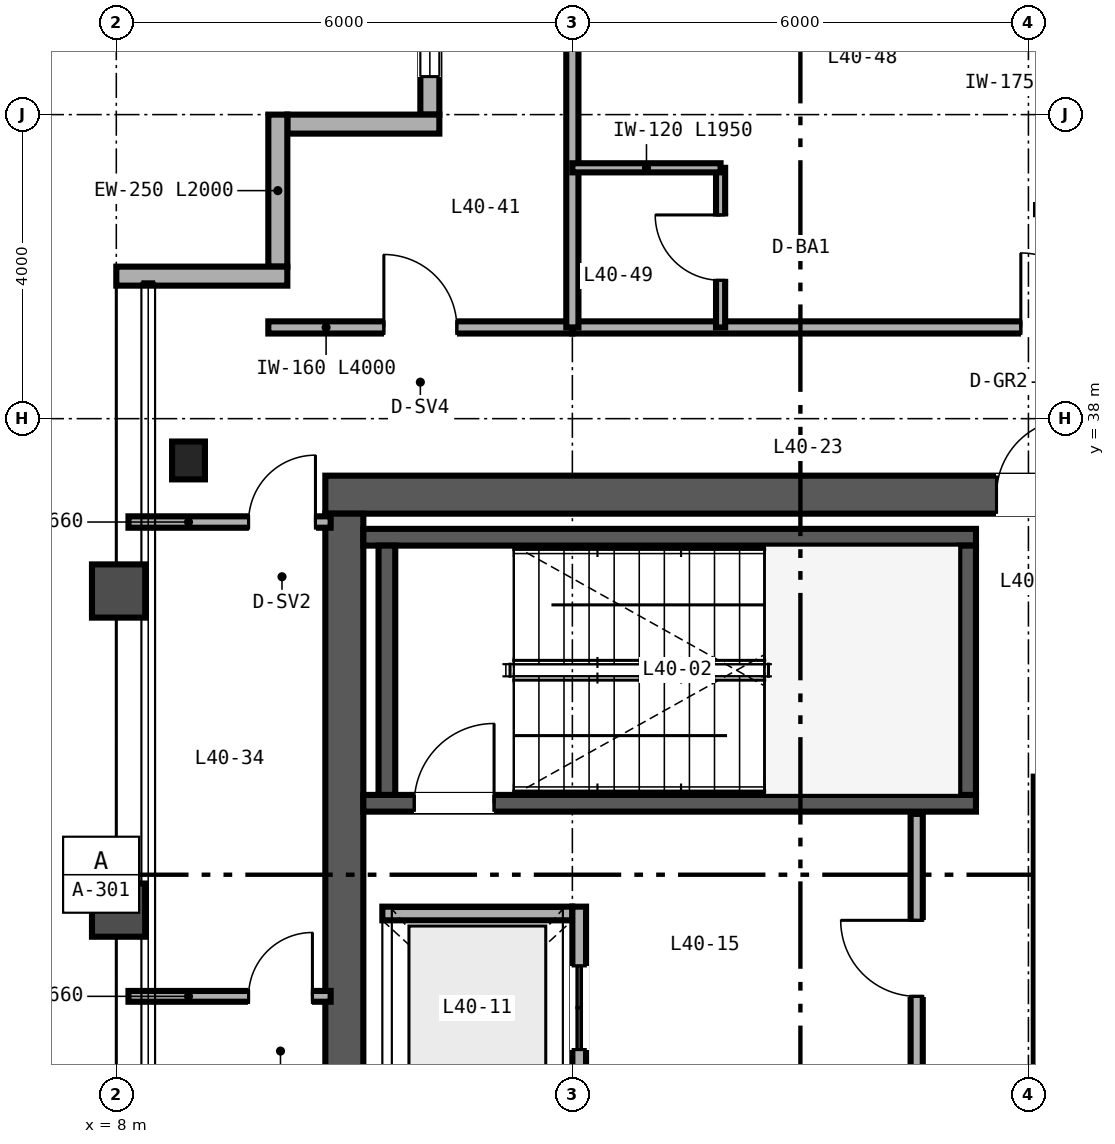
"""IFC4 building model, lengths in metres.
Left out: names, types, materials, properties, quantities, classifications, styles, units other than length and angle.
Written with IfcOpenShell. Run it as: python <this file> out.ifc"""

import sys

from ifc_helpers import new_model, si_unit, direction, frame, frame_2d, origin, origin_2d, place, context, subcontext, project, spatial, rectangle, i_section, extrude, source, transform, mapped, element, fill, save


model = new_model("IFC4")
c1 = context("Model", 3, precision=1e-05, world=origin(), true_north=direction((0.0, 1.0)))
c2 = subcontext(c1, "Body", "Model", "MODEL_VIEW")
j1 = project(units=[si_unit("LENGTHUNIT", "METRE"), si_unit("PLANEANGLEUNIT", "RADIAN")], contexts=[c1])
p1 = place(None, origin())
s1 = spatial("IfcSite", under=j1, at=p1, CompositionType="ELEMENT")
p2 = place(p1, origin())
s2 = spatial("IfcBuilding", under=s1, at=p2, CompositionType="ELEMENT")
p3 = place(p2, frame((0.0, 0.0, 163.2)))
s3 = spatial("IfcBuildingStorey", under=s2, at=p3, CompositionType="ELEMENT", Elevation=163.2)
p4 = place(p3, frame((10.75, 37.0, 0.0), z_axis=(0.0, 0.0, 1.0), x_axis=(1.0, 0.0, 0.0)))
e1 = element("IfcWall", 1, at=p4, inside=s3, PredefinedType="SHEAR", context=c2, shape_type="SweptSolid", body=[
    extrude(rectangle(XDim=12.5, YDim=0.5, at=frame_2d((6.25, 0.0))), origin(), (0.0, 0.0, 1.0), 3.37),
])
p5 = place(p4, frame((8.83, 0.0, 0.0)))
e2 = element("IfcOpeningElement", 2, at=p5, cuts=e1, PredefinedType="OPENING", context=c2, shape_type="SweptSolid", body=[
    extrude(rectangle(XDim=1.0, YDim=2.15, at=frame_2d((0.5, 1.075))), frame((0.0, 0.26, 0.0), z_axis=(0.0, -1.0, 0.0), x_axis=(1.0, 0.0, 0.0)), (0.0, 0.0, 1.0), 0.52),
])
p6 = place(p3, frame((11.0, 15.25, 0.0), z_axis=(0.0, 0.0, 1.0), x_axis=(0.0, 1.0, 0.0)))
e3 = element("IfcWall", 3, at=p6, inside=s3, PredefinedType="SHEAR", context=c2, shape_type="SweptSolid", body=[
    extrude(rectangle(XDim=21.5, YDim=0.5, at=frame_2d((10.75, 0.0))), origin(), (0.0, 0.0, 1.0), 3.37),
])
p7 = place(p3, frame((11.25, 32.94, 0.0), z_axis=(0.0, 0.0, 1.0), x_axis=(1.0, 0.0, 0.0)))
e4 = element("IfcWall", 4, at=p7, inside=s3, PredefinedType="SHEAR", context=c2, shape_type="SweptSolid", body=[
    extrude(rectangle(XDim=8.06, YDim=0.22, at=frame_2d((4.03, 0.0))), origin(), (0.0, 0.0, 1.0), 3.4),
])
p8 = place(p7, frame((0.67, 0.0, 0.0)))
e5 = element("IfcOpeningElement", 5, at=p8, cuts=e4, PredefinedType="OPENING", context=c2, shape_type="SweptSolid", body=[
    extrude(rectangle(XDim=1.05, YDim=2.15, at=frame_2d((0.525, 1.075))), frame((0.0, 0.12, 0.0), z_axis=(0.0, -1.0, 0.0), x_axis=(1.0, 0.0, 0.0)), (0.0, 0.0, 1.0), 0.24),
])
p9 = place(p3, frame((11.25, 36.44, 0.0), z_axis=(0.0, 0.0, 1.0), x_axis=(1.0, 0.0, 0.0)))
e6 = element("IfcWall", 6, at=p9, inside=s3, PredefinedType="SHEAR", context=c2, shape_type="SweptSolid", body=[
    extrude(rectangle(XDim=8.06, YDim=0.22, at=frame_2d((4.03, 0.0))), origin(), (0.0, 0.0, 1.0), 3.4),
])
for number, where, z_axis, x_axis in (
    (7, (11.56, 33.05, 0.0), (0.0, 0.0, 1.0), (0.0, 1.0, 0.0)),
    (8, (19.2, 33.05, 0.0), (0.0, 0.0, 1.0), (0.0, 1.0, 0.0)),
):
    element("IfcWall", number, at=place(p3, frame(where, z_axis=z_axis, x_axis=x_axis)), inside=s3, PredefinedType="SHEAR", context=c2, shape_type="SweptSolid", body=[
        extrude(rectangle(XDim=3.28, YDim=0.22, at=frame_2d((1.64, 0.0))), origin(), (0.0, 0.0, 1.0), 3.4),
    ])
m1 = source(origin(), c2, "Body", "SweptSolid", [
    extrude(i_section(OverallWidth=0.432, OverallDepth=0.498, WebThickness=0.056, FlangeThickness=0.089, FilletRadius=0.025, at=origin_2d()), origin(), (0.0, 0.0, 1.0), 3.37),
])
p10 = place(p3, frame((8.95, 37.45, 0.0), z_axis=(0.0, 0.0, 1.0), x_axis=(1.0, 0.0, 0.0)))
e9 = element("IfcColumn", 9, at=p10, inside=s3, PredefinedType="COLUMN", context=c2, shape_type="MappedRepresentation", body=[
    mapped(m1, transform((0.0, 0.0, 0.0), scale=1.0)),
])
p11 = place(p3, frame((12.125, 44.0, 0.0), z_axis=(0.0, 0.0, 1.0), x_axis=(0.0, -1.0, 0.0)))
e10 = element("IfcWall", 10, at=p11, inside=s3, PredefinedType="SOLIDWALL", context=c2, shape_type="SweptSolid", body=[
    extrude(rectangle(XDim=2.0, YDim=0.25, at=frame_2d((1.0, 0.0))), origin(), (0.0, 0.0, 1.0), 3.37),
])
p12 = place(p11, frame((0.5, 0.0, 0.85)))
e11 = element("IfcOpeningElement", 11, at=p12, cuts=e10, PredefinedType="OPENING", context=c2, shape_type="SweptSolid", body=[
    extrude(rectangle(XDim=1.0, YDim=1.9, at=frame_2d((0.5, 0.95))), frame((0.0, 0.135, 0.0), z_axis=(0.0, -1.0, 0.0), x_axis=(1.0, 0.0, 0.0)), (0.0, 0.0, 1.0), 0.27),
])
for number, where, z_axis, x_axis in (
    (12, (12.25, 41.875, 0.0), (0.0, 0.0, 1.0), (-1.0, 0.0, 0.0)),
    (13, (10.125, 42.0, 0.0), (0.0, 0.0, 1.0), (0.0, -1.0, 0.0)),
):
    element("IfcWall", number, at=place(p3, frame(where, z_axis=z_axis, x_axis=x_axis)), inside=s3, PredefinedType="SOLIDWALL", context=c2, shape_type="SweptSolid", body=[
        extrude(rectangle(XDim=2.0, YDim=0.25, at=frame_2d((1.0, 0.0))), origin(), (0.0, 0.0, 1.0), 3.37),
    ])
p13 = place(p3, frame((10.25, 39.875, 0.0), z_axis=(0.0, 0.0, 1.0), x_axis=(-1.0, 0.0, 0.0)))
e14 = element("IfcWall", 14, at=p13, inside=s3, PredefinedType="SOLIDWALL", context=c2, shape_type="SweptSolid", body=[
    extrude(rectangle(XDim=2.25, YDim=0.25, at=frame_2d((1.125, 0.0))), origin(), (0.0, 0.0, 1.0), 3.37),
])
p14 = place(p3, frame((20.16, 29.0, 0.0), z_axis=(0.0, 0.0, 1.0), x_axis=(0.0, 1.0, 0.0)))
e15 = element("IfcWall", 15, at=p14, inside=s3, PredefinedType="SOLIDWALL", context=c2, shape_type="SweptSolid", body=[
    extrude(rectangle(XDim=4.29, YDim=0.18, at=frame_2d((2.145, 0.0))), origin(), (0.0, 0.0, 1.0), 3.37),
])
p15 = place(p3, frame((11.5, 31.49, 0.0), z_axis=(0.0, 0.0, 1.0), x_axis=(1.0, 0.0, 0.0)))
e16 = element("IfcWall", 16, at=p15, inside=s3, PredefinedType="SOLIDWALL", context=c2, shape_type="SweptSolid", body=[
    extrude(rectangle(XDim=2.5, YDim=0.18, at=frame_2d((1.25, 0.0))), origin(), (0.0, 0.0, 1.0), 3.37),
])
p16 = place(p3, frame((14.09, 28.92, 0.0), z_axis=(0.0, 0.0, 1.0), x_axis=(0.0, 1.0, 0.0)))
e17 = element("IfcWall", 17, at=p16, inside=s3, PredefinedType="SOLIDWALL", context=c2, shape_type="SweptSolid", body=[
    extrude(rectangle(XDim=2.66, YDim=0.18, at=frame_2d((1.33, 0.0))), origin(), (0.0, 0.0, 1.0), 3.37),
])
p17 = place(p16, frame((0.78, 0.0, 0.0)))
e18 = element("IfcOpeningElement", 18, at=p17, cuts=e17, PredefinedType="OPENING", context=c2, shape_type="SweptSolid", body=[
    extrude(rectangle(XDim=1.1, YDim=2.2, at=frame_2d((0.55, 1.1))), frame((0.0, 0.1, 0.0), z_axis=(0.0, -1.0, 0.0), x_axis=(1.0, 0.0, 0.0)), (0.0, 0.0, 1.0), 0.2),
])
p18 = place(p3, frame((18.53, 28.9, 0.0), z_axis=(0.0, 0.0, 1.0), x_axis=(0.0, 1.0, 0.0)))
e19 = element("IfcWall", 19, at=p18, inside=s3, PredefinedType="PARTITIONING", context=c2, shape_type="SweptSolid", body=[
    extrude(rectangle(XDim=3.9, YDim=0.16, at=frame_2d((1.95, 0.0))), origin(), (0.0, 0.0, 1.0), 3.37),
])
p19 = place(p18, frame((1.5, 0.0, 0.0)))
e20 = element("IfcOpeningElement", 20, at=p19, cuts=e19, PredefinedType="OPENING", context=c2, shape_type="SweptSolid", body=[
    extrude(rectangle(XDim=1.0, YDim=2.15, at=frame_2d((0.5, 1.075))), frame((0.0, 0.09, 0.0), z_axis=(0.0, -1.0, 0.0), x_axis=(1.0, 0.0, 0.0)), (0.0, 0.0, 1.0), 0.18),
])
p20 = place(p3, frame((8.16, 36.64, 0.0), z_axis=(0.0, 0.0, 1.0), x_axis=(1.0, 0.0, 0.0)))
e21 = element("IfcWall", 21, at=p20, inside=s3, PredefinedType="PARTITIONING", context=c2, shape_type="SweptSolid", body=[
    extrude(rectangle(XDim=2.66, YDim=0.15, at=frame_2d((1.33, 0.0))), origin(), (0.0, 0.0, 1.0), 2.753),
])
p21 = place(p20, frame((1.58, 0.0, 0.0)))
e22 = element("IfcOpeningElement", 22, at=p21, cuts=e21, PredefinedType="OPENING", context=c2, shape_type="SweptSolid", body=[
    extrude(rectangle(XDim=0.88, YDim=2.15, at=frame_2d((0.44, 1.075))), frame((0.0, 0.085, 0.0), z_axis=(0.0, -1.0, 0.0), x_axis=(1.0, 0.0, 0.0)), (0.0, 0.0, 1.0), 0.17),
])
p22 = place(p3, frame((8.16, 30.4, 0.0), z_axis=(0.0, 0.0, 1.0), x_axis=(1.0, 0.0, 0.0)))
e23 = element("IfcWall", 23, at=p22, inside=s3, PredefinedType="PARTITIONING", context=c2, shape_type="SweptSolid", body=[
    extrude(rectangle(XDim=2.66, YDim=0.142, at=frame_2d((1.33, 0.0))), origin(), (0.0, 0.0, 1.0), 2.753),
])
p23 = place(p22, frame((1.58, 0.0, 0.0)))
e24 = element("IfcOpeningElement", 24, at=p23, cuts=e23, PredefinedType="OPENING", context=c2, shape_type="SweptSolid", body=[
    extrude(rectangle(XDim=0.84, YDim=2.1, at=frame_2d((0.42, 1.05))), frame((0.0, 0.081, 0.0), z_axis=(0.0, -1.0, 0.0), x_axis=(1.0, 0.0, 0.0)), (0.0, 0.0, 1.0), 0.162),
])
p24 = place(p3, frame((10.0, 39.2, 0.0), z_axis=(0.0, 0.0, 1.0), x_axis=(1.0, 0.0, 0.0)))
e25 = element("IfcWall", 25, at=p24, inside=s3, PredefinedType="PARTITIONING", context=c2, shape_type="SweptSolid", body=[
    extrude(rectangle(XDim=4.0, YDim=0.16, at=frame_2d((2.0, 0.0))), origin(), (0.0, 0.0, 1.0), 3.37),
])
p25 = place(p24, frame((1.52, 0.0, 0.0)))
e26 = element("IfcOpeningElement", 26, at=p25, cuts=e25, PredefinedType="OPENING", context=c2, shape_type="SweptSolid", body=[
    extrude(rectangle(XDim=0.96, YDim=2.15, at=frame_2d((0.48, 1.075))), frame((0.0, 0.09, 0.0), z_axis=(0.0, -1.0, 0.0), x_axis=(1.0, 0.0, 0.0)), (0.0, 0.0, 1.0), 0.18),
])
p26 = place(p3, frame((14.0, 39.2, 0.0), z_axis=(0.0, 0.0, 1.0), x_axis=(1.0, 0.0, 0.0)))
e27 = element("IfcWall", 27, at=p26, inside=s3, PredefinedType="PARTITIONING", context=c2, shape_type="SweptSolid", body=[
    extrude(rectangle(XDim=36.0, YDim=0.16, at=frame_2d((18.0, 0.0))), origin(), (0.0, 0.0, 1.0), 2.913),
])
p27 = place(p26, frame((5.9, 0.0, 0.0)))
e28 = element("IfcOpeningElement", 28, at=p27, cuts=e27, PredefinedType="OPENING", context=c2, shape_type="SweptSolid", body=[
    extrude(rectangle(XDim=0.98, YDim=2.2, at=frame_2d((0.49, 1.1))), frame((0.0, 0.09, 0.0), z_axis=(0.0, -1.0, 0.0), x_axis=(1.0, 0.0, 0.0)), (0.0, 0.0, 1.0), 0.18),
])
p28 = place(p26, frame((10.32, 0.0, 0.0)))
e29 = element("IfcOpeningElement", 29, at=p28, cuts=e27, PredefinedType="OPENING", context=c2, shape_type="SweptSolid", body=[
    extrude(rectangle(XDim=0.96, YDim=2.15, at=frame_2d((0.48, 1.075))), frame((0.0, 0.09, 0.0), z_axis=(0.0, -1.0, 0.0), x_axis=(1.0, 0.0, 0.0)), (0.0, 0.0, 1.0), 0.18),
])
p29 = place(p26, frame((17.52, 0.0, 0.0)))
e30 = element("IfcOpeningElement", 30, at=p29, cuts=e27, PredefinedType="OPENING", context=c2, shape_type="SweptSolid", body=[
    extrude(rectangle(XDim=0.96, YDim=2.15, at=frame_2d((0.48, 1.075))), frame((0.0, 0.09, 0.0), z_axis=(0.0, -1.0, 0.0), x_axis=(1.0, 0.0, 0.0)), (0.0, 0.0, 1.0), 0.18),
])
p30 = place(p26, frame((24.72, 0.0, 0.0)))
e31 = element("IfcOpeningElement", 31, at=p30, cuts=e27, PredefinedType="OPENING", context=c2, shape_type="SweptSolid", body=[
    extrude(rectangle(XDim=0.96, YDim=2.15, at=frame_2d((0.48, 1.075))), frame((0.0, 0.09, 0.0), z_axis=(0.0, -1.0, 0.0), x_axis=(1.0, 0.0, 0.0)), (0.0, 0.0, 1.0), 0.18),
])
p31 = place(p26, frame((34.7, 0.0, 0.0)))
e32 = element("IfcOpeningElement", 32, at=p31, cuts=e27, PredefinedType="OPENING", context=c2, shape_type="SweptSolid", body=[
    extrude(rectangle(XDim=0.98, YDim=2.2, at=frame_2d((0.49, 1.1))), frame((0.0, 0.09, 0.0), z_axis=(0.0, -1.0, 0.0), x_axis=(1.0, 0.0, 0.0)), (0.0, 0.0, 1.0), 0.18),
])
p32 = place(p3, frame((14.0, 39.2, 0.0), z_axis=(0.0, 0.0, 1.0), x_axis=(0.0, 1.0, 0.0)))
e33 = element("IfcWall", 33, at=p32, inside=s3, PredefinedType="PARTITIONING", context=c2, shape_type="SweptSolid", body=[
    extrude(rectangle(XDim=6.44, YDim=0.16, at=frame_2d((3.22, 0.0))), origin(), (0.0, 0.0, 1.0), 2.677),
])
p33 = place(p3, frame((15.95, 39.2, 0.0), z_axis=(0.0, 0.0, 1.0), x_axis=(0.0, 1.0, 0.0)))
e34 = element("IfcWall", 34, at=p33, inside=s3, PredefinedType="PARTITIONING", context=c2, shape_type="SweptSolid", body=[
    extrude(rectangle(XDim=2.1, YDim=0.12, at=frame_2d((1.05, 0.0))), origin(), (0.0, 0.0, 1.0), 3.37),
])
p34 = place(p33, frame((0.62, 0.0, 0.0)))
e35 = element("IfcOpeningElement", 35, at=p34, cuts=e34, PredefinedType="OPENING", context=c2, shape_type="SweptSolid", body=[
    extrude(rectangle(XDim=0.86, YDim=2.1, at=frame_2d((0.43, 1.05))), frame((0.0, 0.07, 0.0), z_axis=(0.0, -1.0, 0.0), x_axis=(1.0, 0.0, 0.0)), (0.0, 0.0, 1.0), 0.14),
])
p35 = place(p3, frame((14.0, 41.3, 0.0), z_axis=(0.0, 0.0, 1.0), x_axis=(1.0, 0.0, 0.0)))
e36 = element("IfcWall", 36, at=p35, inside=s3, PredefinedType="PARTITIONING", context=c2, shape_type="SweptSolid", body=[
    extrude(rectangle(XDim=1.95, YDim=0.12, at=frame_2d((0.975, 0.0))), origin(), (0.0, 0.0, 1.0), 3.37),
])
m2 = source(origin(), c2, "Body", "SweptSolid", [
    extrude(rectangle(XDim=1.0, YDim=1.9, at=frame_2d((0.5, 0.95))), frame((0.0, 0.03, 0.0), z_axis=(0.0, -1.0, 0.0), x_axis=(1.0, 0.0, 0.0)), (0.0, 0.0, 1.0), 0.06),
])
p36 = place(p12, origin())
e37 = element("IfcWindow", 37, at=p36, inside=s3, PartitioningType="SINGLE_PANEL", PredefinedType="WINDOW", context=c2, shape_type="MappedRepresentation", body=[
    mapped(m2, transform((0.0, 0.0, 0.0), scale=1.0)),
])
fill(e11, e37)
m3 = source(origin(), c2, "Body", "SweptSolid", [
    extrude(rectangle(XDim=1.05, YDim=2.15, at=frame_2d((0.525, 1.075))), frame((0.0, 0.025, 0.0), z_axis=(0.0, -1.0, 0.0), x_axis=(1.0, 0.0, 0.0)), (0.0, 0.0, 1.0), 0.05),
])
p37 = place(p8, origin())
e38 = element("IfcDoor", 38, at=p37, inside=s3, OperationType="SINGLE_SWING_RIGHT", PredefinedType="DOOR", context=c2, shape_type="MappedRepresentation", body=[
    mapped(m3, transform((0.0, 0.0, 0.0), scale=1.0)),
])
fill(e5, e38)
m4 = source(origin(), c2, "Body", "SweptSolid", [
    extrude(rectangle(XDim=1.1, YDim=2.2, at=frame_2d((0.55, 1.1))), frame((0.0, 0.025, 0.0), z_axis=(0.0, -1.0, 0.0), x_axis=(1.0, 0.0, 0.0)), (0.0, 0.0, 1.0), 0.05),
])
p38 = place(p17, origin())
e39 = element("IfcDoor", 39, at=p38, inside=s3, OperationType="DOUBLE_DOOR_SLIDING", PredefinedType="DOOR", context=c2, shape_type="MappedRepresentation", body=[
    mapped(m4, transform((0.0, 0.0, 0.0), scale=1.0)),
])
fill(e18, e39)
m5 = source(origin(), c2, "Body", "SweptSolid", [
    extrude(rectangle(XDim=1.0, YDim=2.15, at=frame_2d((0.5, 1.075))), frame((0.0, 0.025, 0.0), z_axis=(0.0, -1.0, 0.0), x_axis=(1.0, 0.0, 0.0)), (0.0, 0.0, 1.0), 0.05),
])
p39 = place(p19, origin())
e40 = element("IfcDoor", 40, at=p39, inside=s3, OperationType="SINGLE_SWING_RIGHT", PredefinedType="DOOR", context=c2, shape_type="MappedRepresentation", body=[
    mapped(m5, transform((0.0, 0.0, 0.0), scale=1.0)),
])
fill(e20, e40)
p40 = place(p5, origin())
e41 = element("IfcDoor", 41, at=p40, inside=s3, OperationType="SINGLE_SWING_RIGHT", PredefinedType="DOOR", context=c2, shape_type="MappedRepresentation", body=[
    mapped(m5, transform((0.0, 0.0, 0.0), scale=1.0)),
])
fill(e2, e41)
m6 = source(origin(), c2, "Body", "SweptSolid", [
    extrude(rectangle(XDim=0.88, YDim=2.15, at=frame_2d((0.44, 1.075))), frame((0.0, 0.025, 0.0), z_axis=(0.0, -1.0, 0.0), x_axis=(1.0, 0.0, 0.0)), (0.0, 0.0, 1.0), 0.05),
])
p41 = place(p21, origin())
e42 = element("IfcDoor", 42, at=p41, inside=s3, OperationType="SINGLE_SWING_RIGHT", PredefinedType="DOOR", context=c2, shape_type="MappedRepresentation", body=[
    mapped(m6, transform((0.0, 0.0, 0.0), scale=1.0)),
])
fill(e22, e42)
m7 = source(origin(), c2, "Body", "SweptSolid", [
    extrude(rectangle(XDim=0.84, YDim=2.1, at=frame_2d((0.42, 1.05))), frame((0.0, 0.025, 0.0), z_axis=(0.0, -1.0, 0.0), x_axis=(1.0, 0.0, 0.0)), (0.0, 0.0, 1.0), 0.05),
])
p42 = place(p23, origin())
e43 = element("IfcDoor", 43, at=p42, inside=s3, OperationType="SINGLE_SWING_RIGHT", PredefinedType="DOOR", context=c2, shape_type="MappedRepresentation", body=[
    mapped(m7, transform((0.0, 0.0, 0.0), scale=1.0)),
])
fill(e24, e43)
m8 = source(origin(), c2, "Body", "SweptSolid", [
    extrude(rectangle(XDim=0.96, YDim=2.15, at=frame_2d((0.48, 1.075))), frame((0.0, 0.025, 0.0), z_axis=(0.0, -1.0, 0.0), x_axis=(1.0, 0.0, 0.0)), (0.0, 0.0, 1.0), 0.05),
])
p43 = place(p25, origin())
e44 = element("IfcDoor", 44, at=p43, inside=s3, OperationType="SINGLE_SWING_LEFT", PredefinedType="DOOR", context=c2, shape_type="MappedRepresentation", body=[
    mapped(m8, transform((0.0, 0.0, 0.0), scale=1.0)),
])
fill(e26, e44)
m9 = source(origin(), c2, "Body", "SweptSolid", [
    extrude(rectangle(XDim=0.86, YDim=2.1, at=frame_2d((0.43, 1.05))), frame((0.0, 0.025, 0.0), z_axis=(0.0, -1.0, 0.0), x_axis=(1.0, 0.0, 0.0)), (0.0, 0.0, 1.0), 0.05),
])
p44 = place(p34, origin())
e45 = element("IfcDoor", 45, at=p44, inside=s3, OperationType="SINGLE_SWING_RIGHT", PredefinedType="DOOR", context=c2, shape_type="MappedRepresentation", body=[
    mapped(m9, transform((0.0, 0.0, 0.0), scale=1.0)),
])
fill(e35, e45)
m10 = source(origin(), c2, "Body", "SweptSolid", [
    extrude(rectangle(XDim=0.98, YDim=2.2, at=frame_2d((0.49, 1.1))), frame((0.0, 0.025, 0.0), z_axis=(0.0, -1.0, 0.0), x_axis=(1.0, 0.0, 0.0)), (0.0, 0.0, 1.0), 0.05),
])
p45 = place(p27, origin())
e46 = element("IfcDoor", 46, at=p45, inside=s3, OperationType="SINGLE_SWING_LEFT", PredefinedType="DOOR", context=c2, shape_type="MappedRepresentation", body=[
    mapped(m10, transform((0.0, 0.0, 0.0), scale=1.0)),
])
fill(e28, e46)
save(model, sys.argv[1])
